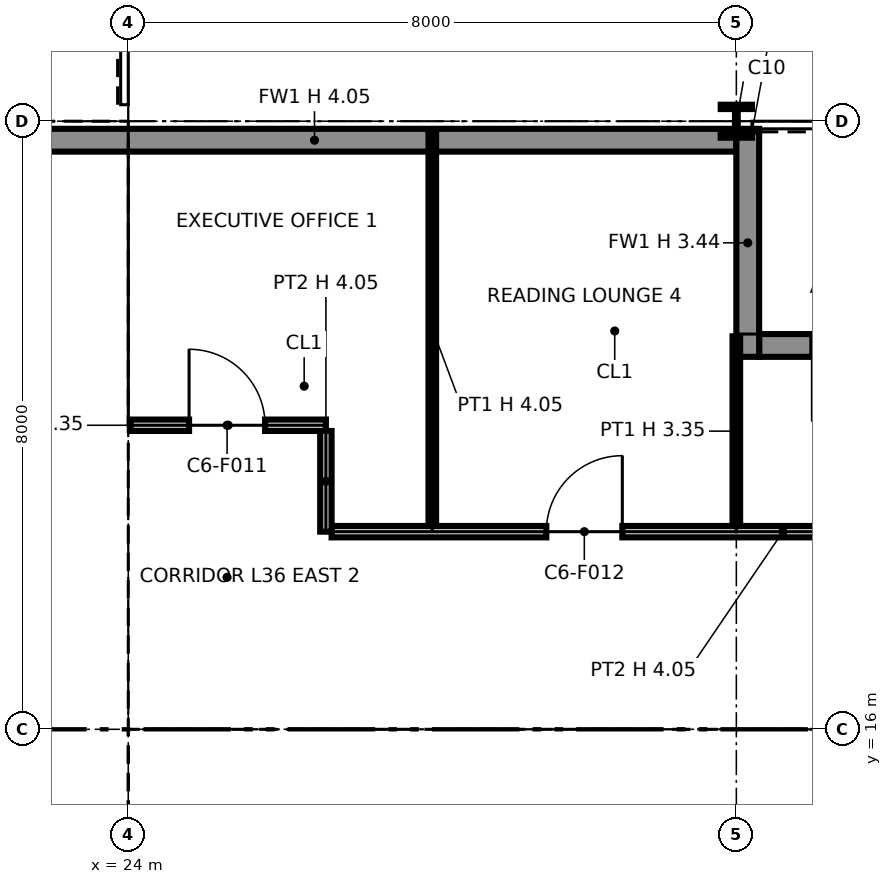
"""IFC4 building model, lengths in metres.
Left out: names, types, materials, properties, quantities, classifications, styles, units other than length and angle.
Written with IfcOpenShell. Run it as: python <this file> out.ifc"""

import sys

from ifc_helpers import new_model, si_unit, direction, frame, frame_2d, origin, origin_2d, place, context, subcontext, project, spatial, polyline, rectangle, i_section, outline, extrude, element, fill, save


model = new_model("IFC4")
c1 = context("Model", 3, precision=1e-05, world=origin(), true_north=direction((0.0, 1.0)))
c2 = subcontext(c1, "Body", "Model", "MODEL_VIEW")
j1 = project(units=[si_unit("LENGTHUNIT", "METRE"), si_unit("PLANEANGLEUNIT", "RADIAN")], contexts=[c1])
p1 = place(None, origin())
s1 = spatial("IfcSite", under=j1, at=p1, CompositionType="ELEMENT")
p2 = place(p1, origin())
s2 = spatial("IfcBuilding", under=s1, at=p2, CompositionType="ELEMENT")
p3 = place(p2, frame((0.0, 0.0, 174.6)))
s3 = spatial("IfcBuildingStorey", under=s2, at=p3, CompositionType="ELEMENT", Elevation=174.6)
p4 = place(p3, frame((24.0, 16.0, 0.0), z_axis=(0.0, 0.0, 1.0), x_axis=(1.0, 0.0, 0.0)))
e1 = element("IfcColumn", 1, at=p4, inside=s3, PredefinedType="COLUMN", context=c2, shape_type="SweptSolid", body=[
    extrude(i_section(OverallWidth=0.401, OverallDepth=0.399, WebThickness=0.025, FlangeThickness=0.04, at=origin_2d()), origin(), (0.0, 0.0, 1.0), 4.05),
])
p5 = place(p3, frame((24.0, 24.0, 0.0), z_axis=(0.0, 0.0, 1.0), x_axis=(1.0, 0.0, 0.0)))
e2 = element("IfcColumn", 2, at=p5, inside=s3, PredefinedType="COLUMN", context=c2, shape_type="SweptSolid", body=[
    extrude(i_section(OverallWidth=0.411, OverallDepth=0.434, WebThickness=0.036, FlangeThickness=0.057, at=origin_2d()), origin(), (0.0, 0.0, 1.0), 4.05),
])
p6 = place(p3, frame((32.0, 16.0, 0.0), z_axis=(0.0, 0.0, 1.0), x_axis=(1.0, 0.0, 0.0)))
e3 = element("IfcColumn", 3, at=p6, inside=s3, PredefinedType="COLUMN", context=c2, shape_type="SweptSolid", body=[
    extrude(i_section(OverallWidth=0.399, OverallDepth=0.386, WebThickness=0.021, FlangeThickness=0.033, at=origin_2d()), origin(), (0.0, 0.0, 1.0), 4.05),
])
p7 = place(p3, frame((32.0, 24.0, 0.0), z_axis=(0.0, 0.0, 1.0), x_axis=(1.0, 0.0, 0.0)))
e4 = element("IfcColumn", 4, at=p7, inside=s3, PredefinedType="COLUMN", context=c2, shape_type="SweptSolid", body=[
    extrude(i_section(OverallWidth=0.411, OverallDepth=0.434, WebThickness=0.036, FlangeThickness=0.057, at=origin_2d()), origin(), (0.0, 0.0, 1.0), 4.05),
])
p8 = place(p3, frame((39.7, 21.05, 0.0), z_axis=(0.0, 0.0, 1.0), x_axis=(-1.0, 0.0, 0.0)))
e5 = element("IfcWall", 5, at=p8, inside=s3, PredefinedType="SOLIDWALL", context=c2, shape_type="SweptSolid", body=[
    extrude(rectangle(XDim=7.4, YDim=0.3, at=frame_2d((3.7, 0.0))), origin(), (0.0, 0.0, 1.0), 4.05),
])
p9 = place(p8, frame((0.3, 0.0, 0.9)))
e6 = element("IfcOpeningElement", 6, at=p9, cuts=e5, PredefinedType="OPENING", context=c2, shape_type="SweptSolid", body=[
    extrude(rectangle(XDim=2.8, YDim=2.2, at=frame_2d((1.4, 1.1))), frame((0.0, 0.16, 0.0), z_axis=(0.0, -1.0, 0.0), x_axis=(1.0, 0.0, 0.0)), (0.0, 0.0, 1.0), 0.32),
])
p10 = place(p8, frame((4.7, 0.0, 0.0)))
e7 = element("IfcOpeningElement", 7, at=p10, cuts=e5, PredefinedType="OPENING", context=c2, shape_type="SweptSolid", body=[
    extrude(rectangle(XDim=2.0, YDim=2.4, at=frame_2d((1.0, 1.2))), frame((0.0, 0.16, 0.0), z_axis=(0.0, -1.0, 0.0), x_axis=(1.0, 0.0, 0.0)), (0.0, 0.0, 1.0), 0.32),
])
p11 = place(p3, frame((32.15, 23.9, 0.0), z_axis=(0.0, 0.0, 1.0), x_axis=(0.0, -1.0, 0.0)))
e8 = element("IfcWall", 8, at=p11, inside=s3, PredefinedType="SOLIDWALL", context=c2, shape_type="SweptSolid", body=[
    extrude(rectangle(XDim=3.0, YDim=0.3, at=frame_2d((1.5, 0.0))), origin(), (0.0, 0.0, 1.0), 3.437),
])
p12 = place(p3, frame((32.0, 23.75, 0.0), z_axis=(0.0, 0.0, 1.0), x_axis=(-1.0, 0.0, 0.0)))
e9 = element("IfcWall", 9, at=p12, inside=s3, PredefinedType="SOLIDWALL", context=c2, shape_type="SweptSolid", body=[
    extrude(rectangle(XDim=11.1, YDim=0.3, at=frame_2d((5.55, 0.0))), origin(), (0.0, 0.0, 1.0), 4.05),
])
p13 = place(p3, frame((8.65, 23.25, 0.0), z_axis=(0.0, 0.0, 1.0), x_axis=(1.0, 0.0, 0.0)))
e10 = element("IfcWall", 10, at=p13, inside=s3, PredefinedType="PARTITIONING", context=c2, shape_type="SweptSolid", body=[
    extrude(outline(polyline([(0.0, 0.0), (14.7, 0.0), (14.7, 4.05), (7.469, 4.05), (7.468, 3.442), (7.232, 3.442), (7.231, 4.05), (0.0, 4.05), (0.0, 0.0)])), frame((0.0, 0.1, 0.0), z_axis=(0.0, -1.0, 0.0), x_axis=(1.0, 0.0, 0.0)), (0.0, 0.0, 1.0), 0.2),
])
p14 = place(p3, frame((8.85, 19.9, 0.0), z_axis=(0.0, 0.0, 1.0), x_axis=(1.0, 0.0, 0.0)))
e11 = element("IfcWall", 11, at=p14, inside=s3, PredefinedType="PARTITIONING", context=c2, shape_type="SweptSolid", body=[
    extrude(outline(polyline([(0.0, 0.0), (14.3, 0.0), (14.3, 3.589), (7.269, 3.589), (7.268, 3.442), (7.032, 3.442), (7.031, 3.589), (0.0, 3.589), (0.0, 0.0)])), frame((0.0, 0.1, 0.0), z_axis=(0.0, -1.0, 0.0), x_axis=(1.0, 0.0, 0.0)), (0.0, 0.0, 1.0), 0.2),
])
p15 = place(p14, frame((2.375, 0.0, 0.0)))
e12 = element("IfcOpeningElement", 12, at=p15, cuts=e11, PredefinedType="OPENING", context=c2, shape_type="SweptSolid", body=[
    extrude(rectangle(XDim=0.9, YDim=2.1, at=frame_2d((0.45, 1.05))), frame((0.0, 0.11, 0.0), z_axis=(0.0, -1.0, 0.0), x_axis=(1.0, 0.0, 0.0)), (0.0, 0.0, 1.0), 0.22),
])
p16 = place(p14, frame((6.4, 0.0, 0.0)))
e13 = element("IfcOpeningElement", 13, at=p16, cuts=e11, PredefinedType="OPENING", context=c2, shape_type="SweptSolid", body=[
    extrude(rectangle(XDim=0.9, YDim=2.1, at=frame_2d((0.45, 1.05))), frame((0.0, 0.11, 0.0), z_axis=(0.0, -1.0, 0.0), x_axis=(1.0, 0.0, 0.0)), (0.0, 0.0, 1.0), 0.22),
])
p17 = place(p14, frame((8.95, 0.0, 0.0)))
e14 = element("IfcOpeningElement", 14, at=p17, cuts=e11, PredefinedType="OPENING", context=c2, shape_type="SweptSolid", body=[
    extrude(rectangle(XDim=0.9, YDim=2.1, at=frame_2d((0.45, 1.05))), frame((0.0, 0.11, 0.0), z_axis=(0.0, -1.0, 0.0), x_axis=(1.0, 0.0, 0.0)), (0.0, 0.0, 1.0), 0.22),
])
p18 = place(p14, frame((11.35, 0.0, 0.0)))
e15 = element("IfcOpeningElement", 15, at=p18, cuts=e11, PredefinedType="OPENING", context=c2, shape_type="SweptSolid", body=[
    extrude(rectangle(XDim=1.0, YDim=2.1, at=frame_2d((0.5, 1.05))), frame((0.0, 0.11, 0.0), z_axis=(0.0, -1.0, 0.0), x_axis=(1.0, 0.0, 0.0)), (0.0, 0.0, 1.0), 0.22),
])
p19 = place(p14, frame((13.175, 0.0, 0.0)))
e16 = element("IfcOpeningElement", 16, at=p19, cuts=e11, PredefinedType="OPENING", context=c2, shape_type="SweptSolid", body=[
    extrude(rectangle(XDim=0.9, YDim=2.1, at=frame_2d((0.45, 1.05))), frame((0.0, 0.11, 0.0), z_axis=(0.0, -1.0, 0.0), x_axis=(1.0, 0.0, 0.0)), (0.0, 0.0, 1.0), 0.22),
])
p20 = place(p3, frame((16.209, 16.0, 0.0), z_axis=(0.0, 0.0, 1.0), x_axis=(1.0, 0.0, 0.0)))
e17 = element("IfcWall", 17, at=p20, inside=s3, PredefinedType="PARTITIONING", context=c2, shape_type="SweptSolid", body=[
    extrude(rectangle(XDim=6.94, YDim=0.6, at=frame_2d((3.47, 0.0))), origin(), (0.0, 0.0, 1.0), 3.442),
])
p21 = place(p20, frame((6.64, 0.0, 0.0), z_axis=(0.0, 0.0, 1.0), x_axis=(-1.0, 0.0, 0.0)))
e18 = element("IfcOpeningElement", 18, at=p21, cuts=e17, PredefinedType="OPENING", context=c2, shape_type="SweptSolid", body=[
    extrude(rectangle(XDim=0.7, YDim=2.1, at=frame_2d((0.35, 1.05))), frame((0.0, 0.31, 0.0), z_axis=(0.0, -1.0, 0.0), x_axis=(1.0, 0.0, 0.0)), (0.0, 0.0, 1.0), 0.62),
])
p22 = place(p3, frame((23.25, 8.85, 0.0), z_axis=(0.0, 0.0, 1.0), x_axis=(0.0, 1.0, 0.0)))
e19 = element("IfcWall", 19, at=p22, inside=s3, PredefinedType="PARTITIONING", context=c2, shape_type="SweptSolid", body=[
    extrude(outline(polyline([(0.0, 0.0), (14.3, 0.0), (14.3, 4.05), (11.231, 4.05), (11.23, 3.589), (11.07, 3.589), (11.069, 4.05), (7.269, 4.05), (7.268, 3.442), (7.032, 3.442), (7.031, 4.05), (1.231, 4.05), (1.23, 3.589), (1.07, 3.589), (1.069, 4.05), (0.0, 4.05), (0.0, 0.0)])), frame((0.0, 0.1, 0.0), z_axis=(0.0, -1.0, 0.0), x_axis=(1.0, 0.0, 0.0)), (0.0, 0.0, 1.0), 0.2),
])
p23 = place(p22, frame((8.3, 0.0, 0.0)))
e20 = element("IfcOpeningElement", 20, at=p23, cuts=e19, PredefinedType="OPENING", context=c2, shape_type="SweptSolid", body=[
    extrude(rectangle(XDim=1.8, YDim=2.1, at=frame_2d((0.9, 1.05))), frame((0.0, 0.11, 0.0), z_axis=(0.0, -1.0, 0.0), x_axis=(1.0, 0.0, 0.0)), (0.0, 0.0, 1.0), 0.22),
])
p24 = place(p3, frame((24.75, 8.85, 0.0), z_axis=(0.0, 0.0, 1.0), x_axis=(0.0, 1.0, 0.0)))
e21 = element("IfcWall", 21, at=p24, inside=s3, PredefinedType="PARTITIONING", context=c2, shape_type="SweptSolid", body=[
    extrude(outline(polyline([(0.0, 0.0), (6.3, 0.0), (6.3, 4.05), (3.231, 4.05), (3.23, 3.589), (3.07, 3.589), (3.069, 4.05), (0.0, 4.05), (0.0, 0.0)])), frame((0.0, 0.1, 0.0), z_axis=(0.0, -1.0, 0.0), x_axis=(1.0, 0.0, 0.0)), (0.0, 0.0, 1.0), 0.2),
])
p25 = place(p3, frame((24.65, 15.25, 0.0), z_axis=(0.0, 0.0, 1.0), x_axis=(1.0, 0.0, 0.0)))
e22 = element("IfcWall", 22, at=p25, inside=s3, PredefinedType="PARTITIONING", context=c2, shape_type="SweptSolid", body=[
    extrude(outline(polyline([(0.0, 0.0), (14.7, 0.0), (14.7, 4.05), (7.469, 4.05), (7.468, 3.442), (7.232, 3.442), (7.231, 4.05), (0.0, 4.05), (0.0, 0.0)])), frame((0.0, 0.1, 0.0), z_axis=(0.0, -1.0, 0.0), x_axis=(1.0, 0.0, 0.0)), (0.0, 0.0, 1.0), 0.2),
])
p26 = place(p25, frame((2.85, 0.0, 0.0)))
e23 = element("IfcOpeningElement", 23, at=p26, cuts=e22, PredefinedType="OPENING", context=c2, shape_type="SweptSolid", body=[
    extrude(rectangle(XDim=1.8, YDim=2.1, at=frame_2d((0.9, 1.05))), frame((0.0, 0.11, 0.0), z_axis=(0.0, -1.0, 0.0), x_axis=(1.0, 0.0, 0.0)), (0.0, 0.0, 1.0), 0.22),
])
p27 = place(p25, frame((9.95, 0.0, 0.0), z_axis=(0.0, 0.0, 1.0), x_axis=(-1.0, 0.0, 0.0)))
e24 = element("IfcOpeningElement", 24, at=p27, cuts=e22, PredefinedType="OPENING", context=c2, shape_type="SweptSolid", body=[
    extrude(rectangle(XDim=1.4, YDim=2.1, at=frame_2d((0.7, 1.05))), frame((0.0, 0.11, 0.0), z_axis=(0.0, -1.0, 0.0), x_axis=(1.0, 0.0, 0.0)), (0.0, 0.0, 1.0), 0.22),
])
p28 = place(p25, frame((13.4, 0.0, 0.0), z_axis=(0.0, 0.0, 1.0), x_axis=(-1.0, 0.0, 0.0)))
e25 = element("IfcOpeningElement", 25, at=p28, cuts=e22, PredefinedType="OPENING", context=c2, shape_type="SweptSolid", body=[
    extrude(rectangle(XDim=1.4, YDim=2.1, at=frame_2d((0.7, 1.05))), frame((0.0, 0.11, 0.0), z_axis=(0.0, -1.0, 0.0), x_axis=(1.0, 0.0, 0.0)), (0.0, 0.0, 1.0), 0.22),
])
p29 = place(p3, frame((32.0, 13.2, 0.0), z_axis=(0.0, 0.0, 1.0), x_axis=(0.0, 1.0, 0.0)))
e26 = element("IfcWall", 26, at=p29, inside=s3, PredefinedType="PARTITIONING", context=c2, shape_type="SweptSolid", body=[
    extrude(rectangle(XDim=1.95, YDim=0.6, at=frame_2d((0.975, 0.0))), origin(), (0.0, 0.0, 1.0), 3.442),
])
p30 = place(p3, frame((26.675, 18.6, 0.0), z_axis=(0.0, 0.0, 1.0), x_axis=(1.0, 0.0, 0.0)))
e27 = element("IfcWall", 27, at=p30, inside=s3, PredefinedType="PARTITIONING", context=c2, shape_type="SweptSolid", body=[
    extrude(rectangle(XDim=11.875, YDim=0.15, at=frame_2d((5.938, 0.0))), origin(), (0.0, 0.0, 1.0), 4.05),
])
p31 = place(p30, frame((6.825, 0.0, 0.0)))
e28 = element("IfcOpeningElement", 28, at=p31, cuts=e27, PredefinedType="OPENING", context=c2, shape_type="SweptSolid", body=[
    extrude(rectangle(XDim=1.0, YDim=2.1, at=frame_2d((0.5, 1.05))), frame((0.0, 0.085, 0.0), z_axis=(0.0, -1.0, 0.0), x_axis=(1.0, 0.0, 0.0)), (0.0, 0.0, 1.0), 0.17),
])
p32 = place(p30, frame((2.825, 0.0, 0.0)))
e29 = element("IfcOpeningElement", 29, at=p32, cuts=e27, PredefinedType="OPENING", context=c2, shape_type="SweptSolid", body=[
    extrude(rectangle(XDim=1.0, YDim=2.1, at=frame_2d((0.5, 1.05))), frame((0.0, 0.085, 0.0), z_axis=(0.0, -1.0, 0.0), x_axis=(1.0, 0.0, 0.0)), (0.0, 0.0, 1.0), 0.17),
])
p33 = place(p3, frame((26.6, 18.6, 0.0), z_axis=(0.0, 0.0, 1.0), x_axis=(0.0, 1.0, 0.0)))
e30 = element("IfcWall", 30, at=p33, inside=s3, PredefinedType="PARTITIONING", context=c2, shape_type="SweptSolid", body=[
    extrude(rectangle(XDim=1.325, YDim=0.15, at=frame_2d((0.663, 0.0))), origin(), (0.0, 0.0, 1.0), 4.05),
])
p34 = place(p3, frame((28.0, 18.675, 0.0), z_axis=(0.0, 0.0, 1.0), x_axis=(0.0, 1.0, 0.0)))
e31 = element("IfcWall", 31, at=p34, inside=s3, PredefinedType="PARTITIONING", context=c2, shape_type="SweptSolid", body=[
    extrude(outline(polyline([(0.0, 0.0), (5.195, 0.0), (5.195, 4.05), (1.625, 4.05), (1.623, 3.354), (1.027, 3.354), (1.025, 4.05), (0.0, 4.05), (0.0, 0.0)])), frame((0.0, 0.05, 0.0), z_axis=(0.0, -1.0, 0.0), x_axis=(1.0, 0.0, 0.0)), (0.0, 0.0, 1.0), 0.1),
])
p35 = place(p3, frame((32.0, 18.675, 0.0), z_axis=(0.0, 0.0, 1.0), x_axis=(0.0, 1.0, 0.0)))
e32 = element("IfcWall", 32, at=p35, inside=s3, PredefinedType="PARTITIONING", context=c2, shape_type="SweptSolid", body=[
    extrude(rectangle(XDim=2.495, YDim=0.1, at=frame_2d((1.248, 0.0))), origin(), (0.0, 0.0, 1.0), 3.354),
])
p36 = place(p3, frame((24.03, 20.0, 0.0), z_axis=(0.0, 0.0, 1.0), x_axis=(1.0, 0.0, 0.0)))
e33 = element("IfcWall", 33, at=p36, inside=s3, PredefinedType="PARTITIONING", context=c2, shape_type="SweptSolid", body=[
    extrude(rectangle(XDim=2.57, YDim=0.15, at=frame_2d((1.285, 0.0))), origin(), (0.0, 0.0, 1.0), 3.354),
])
p37 = place(p36, frame((0.77, 0.0, 0.0)))
e34 = element("IfcOpeningElement", 34, at=p37, cuts=e33, PredefinedType="OPENING", context=c2, shape_type="SweptSolid", body=[
    extrude(rectangle(XDim=1.0, YDim=2.1, at=frame_2d((0.5, 1.05))), frame((0.0, 0.085, 0.0), z_axis=(0.0, -1.0, 0.0), x_axis=(1.0, 0.0, 0.0)), (0.0, 0.0, 1.0), 0.17),
])
p38 = place(p23, origin())
e35 = element("IfcDoor", 35, at=p38, inside=s3, OperationType="DOUBLE_DOOR_SINGLE_SWING", PredefinedType="NOTDEFINED", context=c2, shape_type="SweptSolid", body=[
    extrude(rectangle(XDim=1.8, YDim=2.1, at=frame_2d((0.9, 1.05))), frame((0.0, 0.025, 0.0), z_axis=(0.0, -1.0, 0.0), x_axis=(1.0, 0.0, 0.0)), (0.0, 0.0, 1.0), 0.05),
])
fill(e20, e35)
p39 = place(p26, origin())
e36 = element("IfcDoor", 36, at=p39, inside=s3, OperationType="DOUBLE_DOOR_SINGLE_SWING", PredefinedType="NOTDEFINED", context=c2, shape_type="SweptSolid", body=[
    extrude(rectangle(XDim=1.8, YDim=2.1, at=frame_2d((0.9, 1.05))), frame((0.0, 0.025, 0.0), z_axis=(0.0, -1.0, 0.0), x_axis=(1.0, 0.0, 0.0)), (0.0, 0.0, 1.0), 0.05),
])
fill(e23, e36)
p40 = place(p37, origin())
e37 = element("IfcDoor", 37, at=p40, inside=s3, OperationType="SINGLE_SWING_LEFT", PredefinedType="DOOR", context=c2, shape_type="SweptSolid", body=[
    extrude(rectangle(XDim=1.0, YDim=2.1, at=frame_2d((0.5, 1.05))), frame((0.0, 0.025, 0.0), z_axis=(0.0, -1.0, 0.0), x_axis=(1.0, 0.0, 0.0)), (0.0, 0.0, 1.0), 0.05),
])
fill(e34, e37)
p41 = place(p32, origin())
e38 = element("IfcDoor", 38, at=p41, inside=s3, OperationType="SINGLE_SWING_RIGHT", PredefinedType="DOOR", context=c2, shape_type="SweptSolid", body=[
    extrude(rectangle(XDim=1.0, YDim=2.1, at=frame_2d((0.5, 1.05))), frame((0.0, 0.025, 0.0), z_axis=(0.0, -1.0, 0.0), x_axis=(1.0, 0.0, 0.0)), (0.0, 0.0, 1.0), 0.05),
])
fill(e29, e38)
save(model, sys.argv[1])
